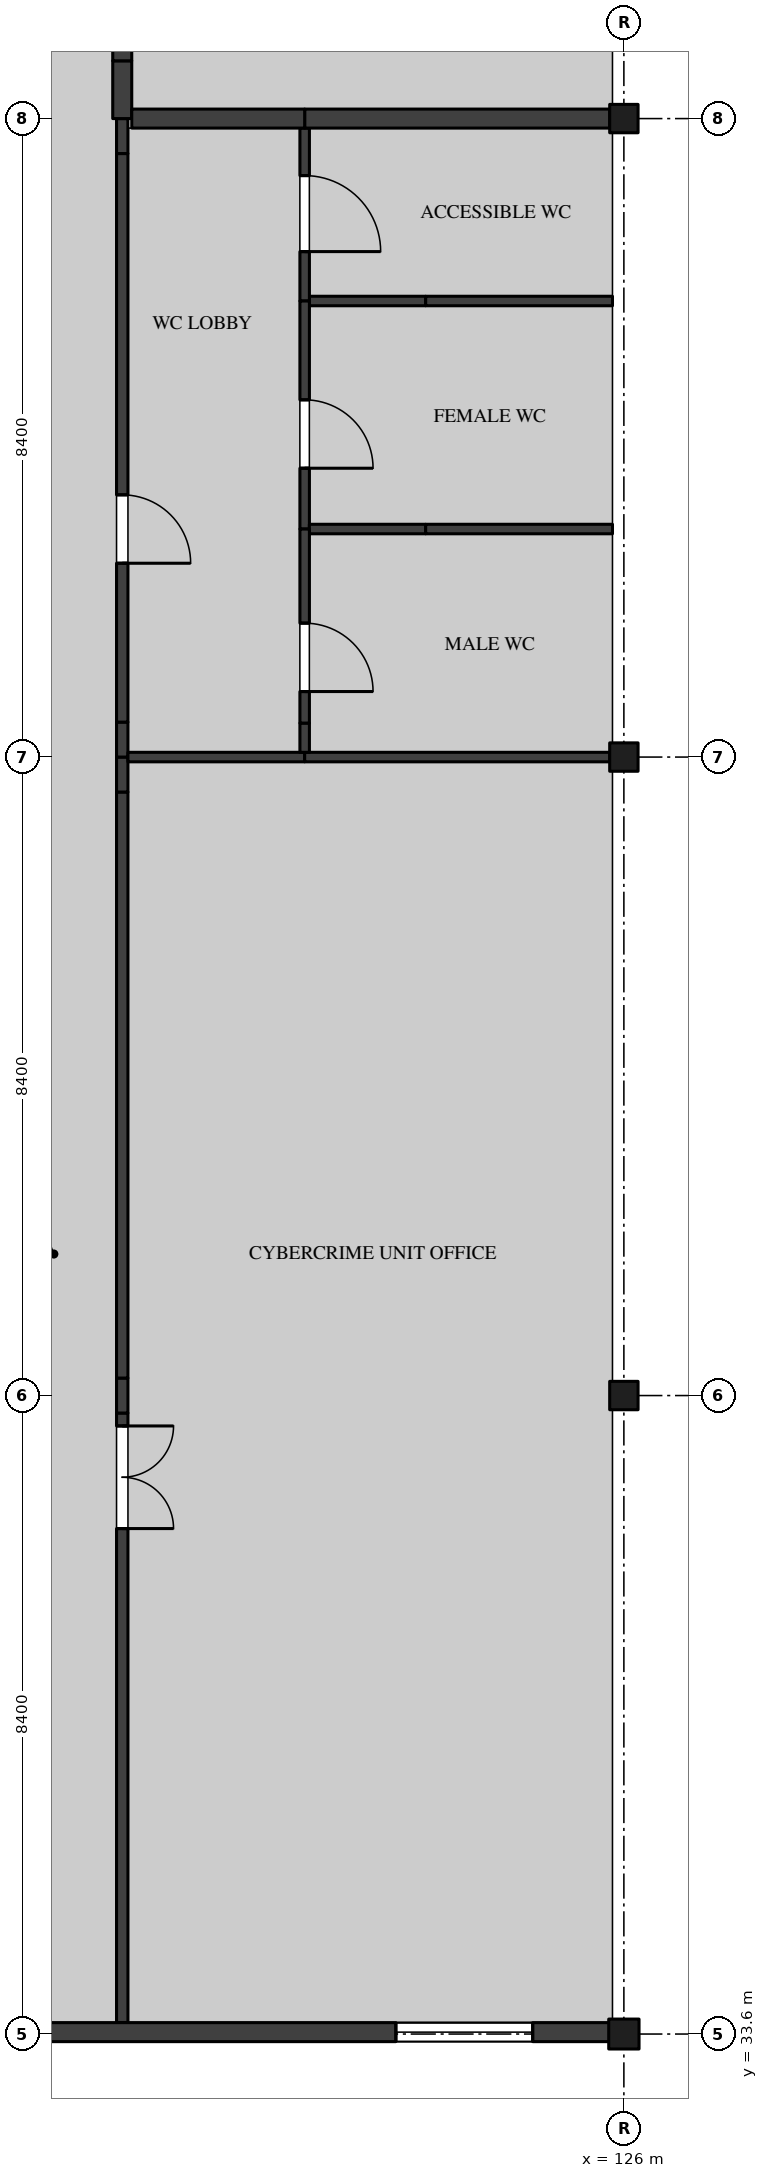
"""IFC4 building model, lengths in metres.
Left out: names, types, materials, properties, quantities, classifications, styles, units other than length and angle.
Written with IfcOpenShell. Run it as: python <this file> out.ifc"""

import sys

from ifc_helpers import new_model, si_unit, direction, frame, frame_2d, origin, origin_2d, place, context, subcontext, project, spatial, rectangle, i_section, extrude, element, fill, save


model = new_model("IFC4")
c1 = context("Model", 3, precision=1e-05, world=origin(), true_north=direction((0.0, 1.0)))
c2 = subcontext(c1, "Body", "Model", "MODEL_VIEW")
j1 = project(units=[si_unit("LENGTHUNIT", "METRE"), si_unit("PLANEANGLEUNIT", "RADIAN")], contexts=[c1])
p1 = place(None, origin())
s1 = spatial("IfcSite", under=j1, at=p1, CompositionType="ELEMENT")
p2 = place(p1, origin())
s2 = spatial("IfcBuilding", under=s1, at=p2, CompositionType="ELEMENT")
p3 = place(p2, frame((0.0, 0.0, 23.4)))
s3 = spatial("IfcBuildingStorey", under=s2, at=p3, CompositionType="ELEMENT", Elevation=23.4)
p4 = place(p3, frame((126.0, 33.6, 0.0), z_axis=(0.0, 0.0, 1.0), x_axis=(1.0, 0.0, 0.0)))
e1 = element("IfcColumn", 1, at=p4, inside=s3, PredefinedType="COLUMN", context=c2, shape_type="SweptSolid", body=[
    extrude(i_section(OverallWidth=0.399, OverallDepth=0.394, WebThickness=0.023, FlangeThickness=0.037, FilletRadius=0.015, at=origin_2d()), origin(), (0.0, 0.0, 1.0), 4.37),
])
for number, where, z_axis, x_axis in (
    (2, (126.0, 42.0, 0.0), (0.0, 0.0, 1.0), (1.0, 0.0, 0.0)),
    (3, (126.0, 50.4, 0.0), (0.0, 0.0, 1.0), (1.0, 0.0, 0.0)),
    (4, (126.0, 58.8, 0.0), (0.0, 0.0, 1.0), (1.0, 0.0, 0.0)),
):
    element("IfcColumn", number, at=place(p3, frame(where, z_axis=z_axis, x_axis=x_axis)), inside=s3, PredefinedType="COLUMN", context=c2, shape_type="SweptSolid", body=[
        extrude(i_section(OverallWidth=0.373, OverallDepth=0.373, WebThickness=0.016, FlangeThickness=0.026, FilletRadius=0.015, at=origin_2d()), origin(), (0.0, 0.0, 1.0), 4.37),
    ])
p5 = place(p3, frame((119.4, 33.75, 0.0), z_axis=(0.0, 0.0, 1.0), x_axis=(0.0, 1.0, 0.0)))
e5 = element("IfcWall", 5, at=p5, inside=s3, PredefinedType="PARTITIONING", context=c2, shape_type="SweptSolid", body=[
    extrude(rectangle(XDim=8.02, YDim=0.15, at=frame_2d((4.01, 0.0))), origin(), (0.0, 0.0, 1.0), 4.37),
])
p6 = place(p5, frame((6.5, 0.0, 0.0)))
e6 = element("IfcOpeningElement", 6, at=p6, cuts=e5, PredefinedType="OPENING", context=c2, shape_type="SweptSolid", body=[
    extrude(rectangle(XDim=1.35, YDim=2.1, at=frame_2d((0.675, 1.05))), frame((0.0, 0.085, 0.0), z_axis=(0.0, -1.0, 0.0), x_axis=(1.0, 0.0, 0.0)), (0.0, 0.0, 1.0), 0.17),
])
p7 = place(p3, frame((119.4, 41.77, 0.0), z_axis=(0.0, 0.0, 1.0), x_axis=(0.0, 1.0, 0.0)))
e7 = element("IfcWall", 7, at=p7, inside=s3, PredefinedType="PARTITIONING", context=c2, shape_type="SweptSolid", body=[
    extrude(rectangle(XDim=0.46, YDim=0.15, at=frame_2d((0.23, 0.0))), origin(), (0.0, 0.0, 1.0), 3.746),
])
p8 = place(p3, frame((119.4, 42.23, 0.0), z_axis=(0.0, 0.0, 1.0), x_axis=(0.0, 1.0, 0.0)))
e8 = element("IfcWall", 8, at=p8, inside=s3, PredefinedType="PARTITIONING", context=c2, shape_type="SweptSolid", body=[
    extrude(rectangle(XDim=7.71, YDim=0.15, at=frame_2d((3.855, 0.0))), origin(), (0.0, 0.0, 1.0), 4.37),
])
p9 = place(p3, frame((119.4, 49.94, 0.0), z_axis=(0.0, 0.0, 1.0), x_axis=(0.0, 1.0, 0.0)))
e9 = element("IfcWall", 9, at=p9, inside=s3, PredefinedType="PARTITIONING", context=c2, shape_type="SweptSolid", body=[
    extrude(rectangle(XDim=0.46, YDim=0.15, at=frame_2d((0.23, 0.0))), origin(), (0.0, 0.0, 1.0), 3.746),
])
p10 = place(p3, frame((119.4, 50.4, 0.0), z_axis=(0.0, 0.0, 1.0), x_axis=(0.0, 1.0, 0.0)))
e10 = element("IfcWall", 10, at=p10, inside=s3, PredefinedType="PARTITIONING", context=c2, shape_type="SweptSolid", body=[
    extrude(rectangle(XDim=0.46, YDim=0.15, at=frame_2d((0.23, 0.0))), origin(), (0.0, 0.0, 1.0), 3.746),
])
p11 = place(p3, frame((119.4, 50.86, 0.0), z_axis=(0.0, 0.0, 1.0), x_axis=(0.0, 1.0, 0.0)))
e11 = element("IfcWall", 11, at=p11, inside=s3, PredefinedType="PARTITIONING", context=c2, shape_type="SweptSolid", body=[
    extrude(rectangle(XDim=7.48, YDim=0.15, at=frame_2d((3.74, 0.0))), origin(), (0.0, 0.0, 1.0), 4.37),
])
p12 = place(p11, frame((2.09, 0.0, 0.0)))
e12 = element("IfcOpeningElement", 12, at=p12, cuts=e11, PredefinedType="OPENING", context=c2, shape_type="SweptSolid", body=[
    extrude(rectangle(XDim=0.9, YDim=2.1, at=frame_2d((0.45, 1.05))), frame((0.0, 0.085, 0.0), z_axis=(0.0, -1.0, 0.0), x_axis=(1.0, 0.0, 0.0)), (0.0, 0.0, 1.0), 0.17),
])
p13 = place(p3, frame((119.4, 58.34, 0.0), z_axis=(0.0, 0.0, 1.0), x_axis=(0.0, 1.0, 0.0)))
e13 = element("IfcWall", 13, at=p13, inside=s3, PredefinedType="PARTITIONING", context=c2, shape_type="SweptSolid", body=[
    extrude(rectangle(XDim=0.46, YDim=0.15, at=frame_2d((0.23, 0.0))), origin(), (0.0, 0.0, 1.0), 3.746),
])
p14 = place(p3, frame((119.4, 58.8, 0.0), z_axis=(0.0, 0.0, 1.0), x_axis=(0.0, 1.0, 0.0)))
e14 = element("IfcWall", 14, at=p14, inside=s3, PredefinedType="PARTITIONING", context=c2, shape_type="SweptSolid", body=[
    extrude(rectangle(XDim=0.76, YDim=0.25, at=frame_2d((0.38, 0.0))), origin(), (0.0, 0.0, 1.0), 3.746),
])
p15 = place(p3, frame((119.4, 59.56, 0.0), z_axis=(0.0, 0.0, 1.0), x_axis=(0.0, 1.0, 0.0)))
e15 = element("IfcWall", 15, at=p15, inside=s3, PredefinedType="PARTITIONING", context=c2, shape_type="SweptSolid", body=[
    extrude(rectangle(XDim=7.49, YDim=0.25, at=frame_2d((3.745, 0.0))), origin(), (0.0, 0.0, 1.0), 4.37),
])
p16 = place(p15, frame((2.54, 0.0, 0.0)))
e16 = element("IfcOpeningElement", 16, at=p16, cuts=e15, PredefinedType="OPENING", context=c2, shape_type="SweptSolid", body=[
    extrude(rectangle(XDim=1.2, YDim=2.4, at=frame_2d((0.6, 1.2))), frame((0.0, 0.135, 0.0), z_axis=(0.0, -1.0, 0.0), x_axis=(1.0, 0.0, 0.0)), (0.0, 0.0, 1.0), 0.27),
])
p17 = place(p3, frame((119.475, 50.4, 0.0), z_axis=(0.0, 0.0, 1.0), x_axis=(1.0, 0.0, 0.0)))
e17 = element("IfcWall", 17, at=p17, inside=s3, PredefinedType="PARTITIONING", context=c2, shape_type="SweptSolid", body=[
    extrude(rectangle(XDim=2.325, YDim=0.125, at=frame_2d((1.163, 0.0))), origin(), (0.0, 0.0, 1.0), 3.746),
])
p18 = place(p3, frame((121.8, 50.4, 0.0), z_axis=(0.0, 0.0, 1.0), x_axis=(1.0, 0.0, 0.0)))
e18 = element("IfcWall", 18, at=p18, inside=s3, PredefinedType="PARTITIONING", context=c2, shape_type="SweptSolid", body=[
    extrude(rectangle(XDim=4.014, YDim=0.125, at=frame_2d((2.007, 0.0))), origin(), (0.0, 0.0, 1.0), 3.746),
])
p19 = place(p3, frame((121.862, 56.4, 0.0), z_axis=(0.0, 0.0, 1.0), x_axis=(1.0, 0.0, 0.0)))
e19 = element("IfcWall", 19, at=p19, inside=s3, PredefinedType="PARTITIONING", context=c2, shape_type="SweptSolid", body=[
    extrude(rectangle(XDim=1.53, YDim=0.125, at=frame_2d((0.765, 0.0))), origin(), (0.0, 0.0, 1.0), 3.895),
])
p20 = place(p3, frame((123.392, 56.4, 0.0), z_axis=(0.0, 0.0, 1.0), x_axis=(1.0, 0.0, 0.0)))
e20 = element("IfcWall", 20, at=p20, inside=s3, PredefinedType="PARTITIONING", context=c2, shape_type="SweptSolid", body=[
    extrude(rectangle(XDim=2.458, YDim=0.125, at=frame_2d((1.229, 0.0))), origin(), (0.0, 0.0, 1.0), 4.37),
])
p21 = place(p3, frame((121.8, 56.4, 0.0), z_axis=(0.0, 0.0, 1.0), x_axis=(0.0, 1.0, 0.0)))
e21 = element("IfcWall", 21, at=p21, inside=s3, PredefinedType="PARTITIONING", context=c2, shape_type="SweptSolid", body=[
    extrude(rectangle(XDim=2.275, YDim=0.125, at=frame_2d((1.138, 0.0))), origin(), (0.0, 0.0, 1.0), 4.37),
])
p22 = place(p21, frame((0.65, 0.0, 0.0)))
e22 = element("IfcOpeningElement", 22, at=p22, cuts=e21, PredefinedType="OPENING", context=c2, shape_type="SweptSolid", body=[
    extrude(rectangle(XDim=1.0, YDim=2.1, at=frame_2d((0.5, 1.05))), frame((0.0, 0.073, 0.0), z_axis=(0.0, -1.0, 0.0), x_axis=(1.0, 0.0, 0.0)), (0.0, 0.0, 1.0), 0.145),
])
p23 = place(p3, frame((121.8, 58.8, 0.0), z_axis=(0.0, 0.0, 1.0), x_axis=(1.0, 0.0, 0.0)))
e23 = element("IfcWall", 23, at=p23, inside=s3, PredefinedType="PARTITIONING", context=c2, shape_type="SweptSolid", body=[
    extrude(rectangle(XDim=4.014, YDim=0.25, at=frame_2d((2.007, 0.0))), origin(), (0.0, 0.0, 1.0), 3.746),
])
p24 = place(p3, frame((121.8, 53.4, 0.0), z_axis=(0.0, 0.0, 1.0), x_axis=(0.0, 1.0, 0.0)))
e24 = element("IfcWall", 24, at=p24, inside=s3, PredefinedType="PARTITIONING", context=c2, shape_type="SweptSolid", body=[
    extrude(rectangle(XDim=3.0, YDim=0.125, at=frame_2d((1.5, 0.0))), origin(), (0.0, 0.0, 1.0), 4.37),
])
p25 = place(p24, frame((0.8, 0.0, 0.0)))
e25 = element("IfcOpeningElement", 25, at=p25, cuts=e24, PredefinedType="OPENING", context=c2, shape_type="SweptSolid", body=[
    extrude(rectangle(XDim=0.9, YDim=2.1, at=frame_2d((0.45, 1.05))), frame((0.0, 0.073, 0.0), z_axis=(0.0, -1.0, 0.0), x_axis=(1.0, 0.0, 0.0)), (0.0, 0.0, 1.0), 0.145),
])
p26 = place(p3, frame((121.862, 53.4, 0.0), z_axis=(0.0, 0.0, 1.0), x_axis=(1.0, 0.0, 0.0)))
e26 = element("IfcWall", 26, at=p26, inside=s3, PredefinedType="PARTITIONING", context=c2, shape_type="SweptSolid", body=[
    extrude(rectangle(XDim=1.53, YDim=0.125, at=frame_2d((0.765, 0.0))), origin(), (0.0, 0.0, 1.0), 3.895),
])
p27 = place(p3, frame((123.392, 53.4, 0.0), z_axis=(0.0, 0.0, 1.0), x_axis=(1.0, 0.0, 0.0)))
e27 = element("IfcWall", 27, at=p27, inside=s3, PredefinedType="PARTITIONING", context=c2, shape_type="SweptSolid", body=[
    extrude(rectangle(XDim=2.458, YDim=0.125, at=frame_2d((1.229, 0.0))), origin(), (0.0, 0.0, 1.0), 4.37),
])
p28 = place(p3, frame((121.8, 50.462, 0.0), z_axis=(0.0, 0.0, 1.0), x_axis=(0.0, 1.0, 0.0)))
e28 = element("IfcWall", 28, at=p28, inside=s3, PredefinedType="PARTITIONING", context=c2, shape_type="SweptSolid", body=[
    extrude(rectangle(XDim=0.385, YDim=0.125, at=frame_2d((0.192, 0.0))), origin(), (0.0, 0.0, 1.0), 3.746),
])
p29 = place(p3, frame((121.8, 50.847, 0.0), z_axis=(0.0, 0.0, 1.0), x_axis=(0.0, 1.0, 0.0)))
e29 = element("IfcWall", 29, at=p29, inside=s3, PredefinedType="PARTITIONING", context=c2, shape_type="SweptSolid", body=[
    extrude(rectangle(XDim=2.553, YDim=0.125, at=frame_2d((1.276, 0.0))), origin(), (0.0, 0.0, 1.0), 4.37),
])
p30 = place(p29, frame((0.415, 0.0, 0.0)))
e30 = element("IfcOpeningElement", 30, at=p30, cuts=e29, PredefinedType="OPENING", context=c2, shape_type="SweptSolid", body=[
    extrude(rectangle(XDim=0.9, YDim=2.1, at=frame_2d((0.45, 1.05))), frame((0.0, 0.073, 0.0), z_axis=(0.0, -1.0, 0.0), x_axis=(1.0, 0.0, 0.0)), (0.0, 0.0, 1.0), 0.145),
])
p31 = place(p3, frame((119.525, 58.8, 0.0), z_axis=(0.0, 0.0, 1.0), x_axis=(1.0, 0.0, 0.0)))
e31 = element("IfcWall", 31, at=p31, inside=s3, PredefinedType="PARTITIONING", context=c2, shape_type="SweptSolid", body=[
    extrude(rectangle(XDim=2.275, YDim=0.25, at=frame_2d((1.138, 0.0))), origin(), (0.0, 0.0, 1.0), 3.746),
])
p32 = place(p3, frame((117.8, 33.625, 0.0), z_axis=(0.0, 0.0, 1.0), x_axis=(1.0, 0.0, 0.0)))
e32 = element("IfcWall", 32, at=p32, inside=s3, PredefinedType="SOLIDWALL", context=c2, shape_type="SweptSolid", body=[
    extrude(rectangle(XDim=8.199, YDim=0.25, at=frame_2d((4.099, 0.0))), origin(), (0.0, 0.0, 1.0), 3.746),
])
p33 = place(p32, frame((5.2, 0.0, 0.9)))
e33 = element("IfcOpeningElement", 33, at=p33, cuts=e32, PredefinedType="OPENING", context=c2, shape_type="SweptSolid", body=[
    extrude(rectangle(XDim=1.8, YDim=1.95, at=frame_2d((0.9, 0.975))), frame((0.0, 0.135, 0.0), z_axis=(0.0, -1.0, 0.0), x_axis=(1.0, 0.0, 0.0)), (0.0, 0.0, 1.0), 0.27),
])
p34 = place(p6, frame((1.35, 0.0, 0.0), z_axis=(0.0, 0.0, 1.0), x_axis=(-1.0, 0.0, 0.0)))
e34 = element("IfcDoor", 34, at=p34, inside=s3, OperationType="DOUBLE_DOOR_SINGLE_SWING", PredefinedType="DOOR", context=c2, shape_type="SweptSolid", body=[
    extrude(rectangle(XDim=1.35, YDim=2.1, at=frame_2d((0.675, 1.05))), frame((0.0, 0.025, 0.0), z_axis=(0.0, -1.0, 0.0), x_axis=(1.0, 0.0, 0.0)), (0.0, 0.0, 1.0), 0.05),
])
fill(e6, e34)
p35 = place(p22, frame((1.0, 0.0, 0.0), z_axis=(0.0, 0.0, 1.0), x_axis=(-1.0, 0.0, 0.0)))
e35 = element("IfcDoor", 35, at=p35, inside=s3, OperationType="SINGLE_SWING_LEFT", PredefinedType="DOOR", context=c2, shape_type="SweptSolid", body=[
    extrude(rectangle(XDim=1.0, YDim=2.1, at=frame_2d((0.5, 1.05))), frame((0.0, 0.02, 0.0), z_axis=(0.0, -1.0, 0.0), x_axis=(1.0, 0.0, 0.0)), (0.0, 0.0, 1.0), 0.04),
])
fill(e22, e35)
p36 = place(p25, frame((0.9, 0.0, 0.0), z_axis=(0.0, 0.0, 1.0), x_axis=(-1.0, 0.0, 0.0)))
e36 = element("IfcDoor", 36, at=p36, inside=s3, OperationType="SINGLE_SWING_LEFT", PredefinedType="DOOR", context=c2, shape_type="SweptSolid", body=[
    extrude(rectangle(XDim=0.9, YDim=2.1, at=frame_2d((0.45, 1.05))), frame((0.0, 0.02, 0.0), z_axis=(0.0, -1.0, 0.0), x_axis=(1.0, 0.0, 0.0)), (0.0, 0.0, 1.0), 0.04),
])
fill(e25, e36)
p37 = place(p12, frame((0.9, 0.0, 0.0), z_axis=(0.0, 0.0, 1.0), x_axis=(-1.0, 0.0, 0.0)))
e37 = element("IfcDoor", 37, at=p37, inside=s3, OperationType="SINGLE_SWING_LEFT", PredefinedType="DOOR", context=c2, shape_type="SweptSolid", body=[
    extrude(rectangle(XDim=0.9, YDim=2.1, at=frame_2d((0.45, 1.05))), frame((0.0, 0.025, 0.0), z_axis=(0.0, -1.0, 0.0), x_axis=(1.0, 0.0, 0.0)), (0.0, 0.0, 1.0), 0.05),
])
fill(e12, e37)
p38 = place(p30, frame((0.9, 0.0, 0.0), z_axis=(0.0, 0.0, 1.0), x_axis=(-1.0, 0.0, 0.0)))
e38 = element("IfcDoor", 38, at=p38, inside=s3, OperationType="SINGLE_SWING_LEFT", PredefinedType="DOOR", context=c2, shape_type="SweptSolid", body=[
    extrude(rectangle(XDim=0.9, YDim=2.1, at=frame_2d((0.45, 1.05))), frame((0.0, 0.02, 0.0), z_axis=(0.0, -1.0, 0.0), x_axis=(1.0, 0.0, 0.0)), (0.0, 0.0, 1.0), 0.04),
])
fill(e30, e38)
p39 = place(p33, origin())
e39 = element("IfcWindow", 39, at=p39, inside=s3, PartitioningType="SINGLE_PANEL", PredefinedType="WINDOW", context=c2, shape_type="SweptSolid", body=[
    extrude(rectangle(XDim=1.8, YDim=1.95, at=frame_2d((0.9, 0.975))), frame((0.0, 0.04, 0.0), z_axis=(0.0, -1.0, 0.0), x_axis=(1.0, 0.0, 0.0)), (0.0, 0.0, 1.0), 0.08),
])
fill(e33, e39)
save(model, sys.argv[1])
